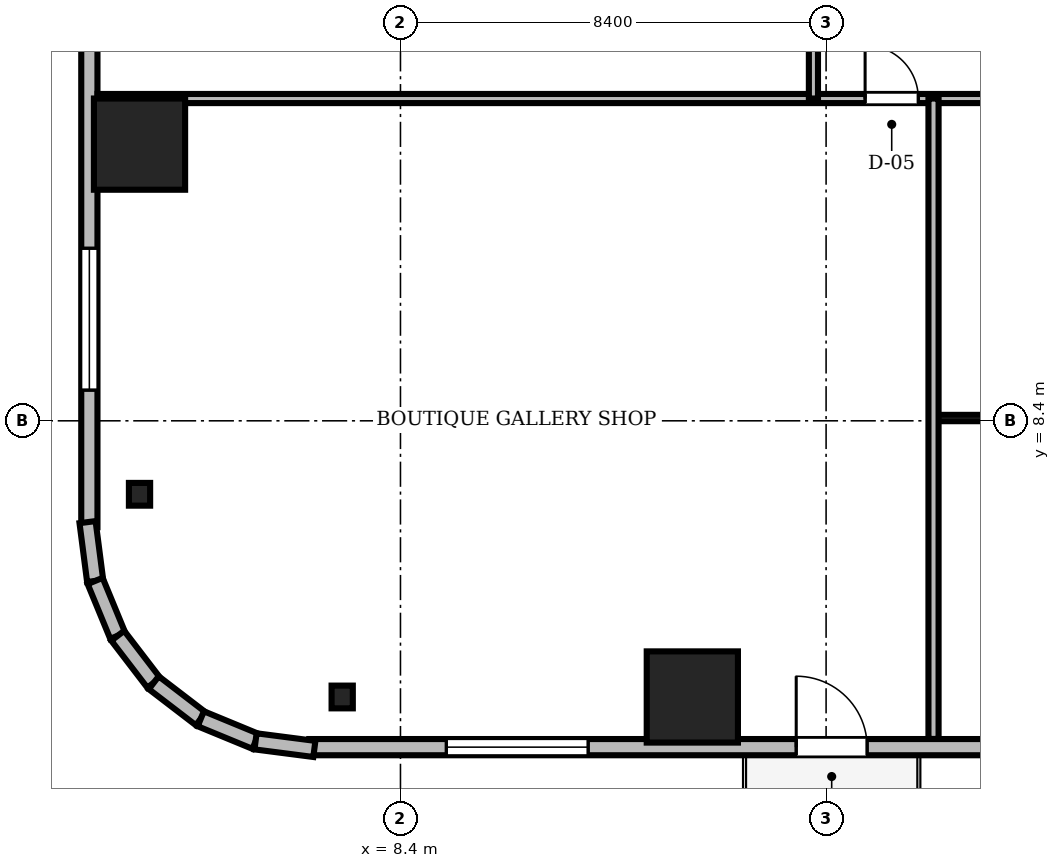
"""IFC4 building model, lengths in metres.
Left out: names, types, materials, properties, quantities, classifications, styles, units other than length and angle.
Written with IfcOpenShell. Run it as: python <this file> out.ifc"""

import sys

from ifc_helpers import new_model, si_unit, direction, frame, frame_2d, origin, origin_2d, place, context, subcontext, project, spatial, rectangle, i_section, extrude, source, transform, mapped, element, fill, save


model = new_model("IFC4")
c1 = context("Model", 3, precision=1e-05, world=origin(), true_north=direction((0.0, 1.0)))
c2 = subcontext(c1, "Body", "Model", "MODEL_VIEW")
j1 = project(units=[si_unit("LENGTHUNIT", "METRE"), si_unit("PLANEANGLEUNIT", "RADIAN")], contexts=[c1])
p1 = place(None, origin())
s1 = spatial("IfcSite", under=j1, at=p1, CompositionType="ELEMENT")
p2 = place(p1, origin())
s2 = spatial("IfcBuilding", under=s1, at=p2, CompositionType="ELEMENT")
p3 = place(p2, frame((0.0, 0.0, 78.7)))
s3 = spatial("IfcBuildingStorey", under=s2, at=p3, CompositionType="ELEMENT", Elevation=78.7)
m1 = source(origin(), c2, "Body", "SweptSolid", [
    extrude(rectangle(XDim=1.8, YDim=1.8, at=origin_2d()), origin(), (0.0, 0.0, 1.0), 3.41),
])
for number, where, z_axis, x_axis in (
    (1, (14.16, 2.95, 0.0), (0.0, 0.0, 1.0), (1.0, 0.0, 0.0)),
    (2, (3.25, 13.86, 0.0), (0.0, 0.0, 1.0), (1.0, 0.0, 0.0)),
):
    element("IfcColumn", number, at=place(p3, frame(where, z_axis=z_axis, x_axis=x_axis)), inside=s3, PredefinedType="COLUMN", context=c2, shape_type="MappedRepresentation", body=[
        mapped(m1, transform((0.0, 0.0, 0.0), scale=1.0)),
    ])
m2 = source(origin(), c2, "Body", "SweptSolid", [
    extrude(i_section(OverallWidth=0.419, OverallDepth=0.449, WebThickness=0.031, FlangeThickness=0.048, FilletRadius=0.015, at=origin_2d()), origin(), (0.0, 0.0, 1.0), 3.41),
])
for number, where, z_axis, x_axis in (
    (3, (7.25, 2.95, 0.0), (0.0, 0.0, 1.0), (1.0, 0.0, 0.0)),
    (4, (3.25, 6.95, 0.0), (0.0, 0.0, 1.0), (1.0, 0.0, 0.0)),
):
    element("IfcColumn", number, at=place(p3, frame(where, z_axis=z_axis, x_axis=x_axis)), inside=s3, PredefinedType="COLUMN", context=c2, shape_type="MappedRepresentation", body=[
        mapped(m2, transform((0.0, 0.0, 0.0), scale=1.0)),
    ])
m3 = source(origin(), c2, "Body", "SweptSolid", [
    extrude(rectangle(XDim=15.6, YDim=0.32, at=frame_2d((7.8, 0.0))), origin(), (0.0, 0.0, 1.0), 3.41),
])
p4 = place(p3, frame((6.6, 1.96, 0.0), z_axis=(0.0, 0.0, 1.0), x_axis=(1.0, 0.0, 0.0)))
e5 = element("IfcWall", 5, at=p4, inside=s3, PredefinedType="SOLIDWALL", context=c2, shape_type="MappedRepresentation", body=[
    mapped(m3, transform((0.0, 0.0, 0.0), scale=1.0)),
])
m4 = source(origin(), c2, "Body", "SweptSolid", [
    extrude(rectangle(XDim=1.4, YDim=2.3, at=frame_2d((0.7, 1.15))), frame((0.0, 0.17, 0.0), z_axis=(0.0, -1.0, 0.0), x_axis=(1.0, 0.0, 0.0)), (0.0, 0.0, 1.0), 0.34),
])
p5 = place(p4, frame((9.61, 0.0, 0.0)))
e6 = element("IfcOpeningElement", 6, at=p5, cuts=e5, PredefinedType="OPENING", context=c2, shape_type="MappedRepresentation", body=[
    mapped(m4, transform((0.0, 0.0, 0.0), scale=1.0)),
])
m5 = source(origin(), c2, "Body", "SweptSolid", [
    extrude(rectangle(XDim=2.8, YDim=2.4, at=frame_2d((1.4, 1.2))), frame((0.0, 0.17, 0.0), z_axis=(0.0, -1.0, 0.0), x_axis=(1.0, 0.0, 0.0)), (0.0, 0.0, 1.0), 0.34),
])
p6 = place(p4, frame((2.705, 0.0, 0.72)))
e7 = element("IfcOpeningElement", 7, at=p6, cuts=e5, PredefinedType="OPENING", context=c2, shape_type="MappedRepresentation", body=[
    mapped(m5, transform((0.0, 0.0, 0.0), scale=1.0)),
])
p7 = place(p3, frame((2.26, 21.9, 0.0), z_axis=(0.0, 0.0, 1.0), x_axis=(0.0, -1.0, 0.0)))
e8 = element("IfcWall", 8, at=p7, inside=s3, PredefinedType="SOLIDWALL", context=c2, shape_type="MappedRepresentation", body=[
    mapped(m3, transform((0.0, 0.0, 0.0), scale=1.0)),
])
p8 = place(p7, frame((10.095, 0.0, 0.72)))
e9 = element("IfcOpeningElement", 9, at=p8, cuts=e8, PredefinedType="OPENING", context=c2, shape_type="MappedRepresentation", body=[
    mapped(m5, transform((0.0, 0.0, 0.0), scale=1.0)),
])
m6 = source(origin(), c2, "Body", "SweptSolid", [
    extrude(rectangle(XDim=1.171, YDim=0.32, at=frame_2d((0.585, 0.0))), origin(), (0.0, 0.0, 1.0), 3.41),
])
p9 = place(p3, frame((2.224, 6.401, 0.0), z_axis=(0.0, 0.0, 1.0), x_axis=(0.128269133229, -0.991739395941, 0.0)))
e10 = element("IfcWall", 10, at=p9, inside=s3, PredefinedType="SOLIDWALL", context=c2, shape_type="MappedRepresentation", body=[
    mapped(m6, transform((0.0, 0.0, 0.0), scale=1.0)),
])
m7 = source(origin(), c2, "Body", "SweptSolid", [
    extrude(rectangle(XDim=1.169, YDim=0.32, at=frame_2d((0.584, 0.0))), origin(), (0.0, 0.0, 1.0), 3.41),
])
for number, where, z_axis, x_axis in (
    (11, (2.375, 5.24, 0.0), (0.0, 0.0, 1.0), (0.381, -0.925, 0.0)),
    (12, (2.82, 4.159, 0.0), (0.0, 0.0, 1.0), (0.608, -0.794, 0.0)),
):
    element("IfcWall", number, at=place(p3, frame(where, z_axis=z_axis, x_axis=x_axis)), inside=s3, PredefinedType="SOLIDWALL", context=c2, shape_type="MappedRepresentation", body=[
        mapped(m7, transform((0.0, 0.0, 0.0), scale=1.0)),
    ])
m8 = source(origin(), c2, "Body", "SweptSolid", [
    extrude(rectangle(XDim=1.169, YDim=0.32, at=frame_2d((0.584, 0.0))), origin(), (0.0, 0.0, 1.0), 3.41),
])
p10 = place(p3, frame((3.531, 3.231, 0.0), z_axis=(0.0, 0.0, 1.0), x_axis=(0.793663520347, -0.608356981114, 0.0)))
e13 = element("IfcWall", 13, at=p10, inside=s3, PredefinedType="SOLIDWALL", context=c2, shape_type="MappedRepresentation", body=[
    mapped(m8, transform((0.0, 0.0, 0.0), scale=1.0)),
])
m9 = source(origin(), c2, "Body", "SweptSolid", [
    extrude(rectangle(XDim=1.169, YDim=0.32, at=frame_2d((0.585, 0.0))), origin(), (0.0, 0.0, 1.0), 3.41),
])
p11 = place(p3, frame((4.459, 2.52, 0.0), z_axis=(0.0, 0.0, 1.0), x_axis=(0.924479075121, -0.381232789334, 0.0)))
e14 = element("IfcWall", 14, at=p11, inside=s3, PredefinedType="SOLIDWALL", context=c2, shape_type="MappedRepresentation", body=[
    mapped(m9, transform((0.0, 0.0, 0.0), scale=1.0)),
])
m10 = source(origin(), c2, "Body", "SweptSolid", [
    extrude(rectangle(XDim=1.17, YDim=0.32, at=frame_2d((0.585, 0.0))), origin(), (0.0, 0.0, 1.0), 3.41),
])
p12 = place(p3, frame((5.54, 2.074, 0.0), z_axis=(0.0, 0.0, 1.0), x_axis=(0.991762485493, -0.128090485085, 0.0)))
e15 = element("IfcWall", 15, at=p12, inside=s3, PredefinedType="SOLIDWALL", context=c2, shape_type="MappedRepresentation", body=[
    mapped(m10, transform((0.0, 0.0, 0.0), scale=1.0)),
])
m11 = source(origin(), c2, "Body", "SweptSolid", [
    extrude(rectangle(XDim=46.156, YDim=0.18, at=frame_2d((23.078, 0.0))), origin(), (0.0, 0.0, 1.0), 2.652),
])
p13 = place(p3, frame((2.422, 14.76, 0.0), z_axis=(0.0, 0.0, 1.0), x_axis=(1.0, 0.0, 0.0)))
e16 = element("IfcWall", 16, at=p13, inside=s3, PredefinedType="PARTITIONING", context=c2, shape_type="MappedRepresentation", body=[
    mapped(m11, transform((0.0, 0.0, 0.0), scale=1.0)),
])
m12 = source(origin(), c2, "Body", "SweptSolid", [
    extrude(rectangle(XDim=1.05, YDim=2.2, at=frame_2d((0.525, 1.1))), frame((0.0, 0.1, 0.0), z_axis=(0.0, -1.0, 0.0), x_axis=(1.0, 0.0, 0.0)), (0.0, 0.0, 1.0), 0.2),
])
p14 = place(p13, frame((15.148, 0.0, 0.0)))
e17 = element("IfcOpeningElement", 17, at=p14, cuts=e16, PredefinedType="OPENING", context=c2, shape_type="MappedRepresentation", body=[
    mapped(m12, transform((0.0, 0.0, 0.0), scale=1.0)),
])
p15 = place(p13, frame((19.38, 0.0, 0.0)))
e18 = element("IfcOpeningElement", 18, at=p15, cuts=e16, PredefinedType="OPENING", context=c2, shape_type="MappedRepresentation", body=[
    mapped(m12, transform((0.0, 0.0, 0.0), scale=1.0)),
])
p16 = place(p13, frame((26.183, 0.0, 0.0)))
e19 = element("IfcOpeningElement", 19, at=p16, cuts=e16, PredefinedType="OPENING", context=c2, shape_type="MappedRepresentation", body=[
    mapped(m12, transform((0.0, 0.0, 0.0), scale=1.0)),
])
p17 = place(p13, frame((32.986, 0.0, 0.0)))
e20 = element("IfcOpeningElement", 20, at=p17, cuts=e16, PredefinedType="OPENING", context=c2, shape_type="MappedRepresentation", body=[
    mapped(m12, transform((0.0, 0.0, 0.0), scale=1.0)),
])
p18 = place(p13, frame((40.998, 0.0, 0.0)))
e21 = element("IfcOpeningElement", 21, at=p18, cuts=e16, PredefinedType="OPENING", context=c2, shape_type="MappedRepresentation", body=[
    mapped(m12, transform((0.0, 0.0, 0.0), scale=1.0)),
])
m13 = source(origin(), c2, "Body", "SweptSolid", [
    extrude(rectangle(XDim=6.803, YDim=0.125, at=frame_2d((3.401, 0.0))), origin(), (0.0, 0.0, 1.0), 2.802),
])
p19 = place(p3, frame((18.92, 8.455, 0.0), z_axis=(0.0, 0.0, 1.0), x_axis=(1.0, 0.0, 0.0)))
e22 = element("IfcWall", 22, at=p19, inside=s3, PredefinedType="PARTITIONING", context=c2, shape_type="MappedRepresentation", body=[
    mapped(m13, transform((0.0, 0.0, 0.0), scale=1.0)),
])
m14 = source(origin(), c2, "Body", "SweptSolid", [
    extrude(rectangle(XDim=0.95, YDim=2.15, at=frame_2d((0.475, 1.075))), frame((0.0, 0.073, 0.0), z_axis=(0.0, -1.0, 0.0), x_axis=(1.0, 0.0, 0.0)), (0.0, 0.0, 1.0), 0.145),
])
p20 = place(p19, frame((2.922, 0.0, 0.0)))
e23 = element("IfcOpeningElement", 23, at=p20, cuts=e22, PredefinedType="OPENING", context=c2, shape_type="MappedRepresentation", body=[
    mapped(m14, transform((0.0, 0.0, 0.0), scale=1.0)),
])
m15 = source(origin(), c2, "Body", "SweptSolid", [
    extrude(rectangle(XDim=13.79, YDim=0.18, at=frame_2d((6.895, 0.0))), origin(), (0.0, 0.0, 1.0), 2.802),
])
p21 = place(p3, frame((16.55, 14.76, 0.0), z_axis=(0.0, 0.0, 1.0), x_axis=(0.0, 1.0, 0.0)))
e24 = element("IfcWall", 24, at=p21, inside=s3, PredefinedType="PARTITIONING", context=c2, shape_type="MappedRepresentation", body=[
    mapped(m15, transform((0.0, 0.0, 0.0), scale=1.0)),
])
m16 = source(origin(), c2, "Body", "SweptSolid", [
    extrude(rectangle(XDim=12.638, YDim=0.2, at=frame_2d((6.319, 0.0))), origin(), (0.0, 0.0, 1.0), 2.652),
])
p22 = place(p3, frame((18.92, 2.122, 0.0), z_axis=(0.0, 0.0, 1.0), x_axis=(0.0, 1.0, 0.0)))
e25 = element("IfcWall", 25, at=p22, inside=s3, PredefinedType="PARTITIONING", context=c2, shape_type="MappedRepresentation", body=[
    mapped(m16, transform((0.0, 0.0, 0.0), scale=1.0)),
])
m17 = source(origin(), c2, "Body", "SweptSolid", [
    extrude(rectangle(XDim=1.4, YDim=2.3, at=frame_2d((0.7, 1.15))), frame((0.0, 0.025, 0.0), z_axis=(0.0, -1.0, 0.0), x_axis=(1.0, 0.0, 0.0)), (0.0, 0.0, 1.0), 0.05),
])
p23 = place(p5, frame((1.4, 0.0, 0.0), z_axis=(0.0, 0.0, 1.0), x_axis=(-1.0, 0.0, 0.0)))
e26 = element("IfcDoor", 26, at=p23, inside=s3, OperationType="DOUBLE_DOOR_SLIDING", PredefinedType="DOOR", context=c2, shape_type="MappedRepresentation", body=[
    mapped(m17, transform((0.0, 0.0, 0.0), scale=1.0)),
])
fill(e6, e26)
m18 = source(origin(), c2, "Body", "SweptSolid", [
    extrude(rectangle(XDim=2.8, YDim=2.4, at=frame_2d((1.4, 1.2))), frame((0.0, 0.03, 0.0), z_axis=(0.0, -1.0, 0.0), x_axis=(1.0, 0.0, 0.0)), (0.0, 0.0, 1.0), 0.06),
])
p24 = place(p6, origin())
e27 = element("IfcWindow", 27, at=p24, inside=s3, PartitioningType="SINGLE_PANEL", PredefinedType="WINDOW", context=c2, shape_type="MappedRepresentation", body=[
    mapped(m18, transform((0.0, 0.0, 0.0), scale=1.0)),
])
fill(e7, e27)
p25 = place(p8, origin())
e28 = element("IfcWindow", 28, at=p25, inside=s3, PartitioningType="SINGLE_PANEL", PredefinedType="WINDOW", context=c2, shape_type="MappedRepresentation", body=[
    mapped(m18, transform((0.0, 0.0, 0.0), scale=1.0)),
])
fill(e9, e28)
m19 = source(origin(), c2, "Body", "SweptSolid", [
    extrude(rectangle(XDim=1.05, YDim=2.2, at=frame_2d((0.525, 1.1))), frame((0.0, 0.025, 0.0), z_axis=(0.0, -1.0, 0.0), x_axis=(1.0, 0.0, 0.0)), (0.0, 0.0, 1.0), 0.05),
])
p26 = place(p14, origin())
e29 = element("IfcDoor", 29, at=p26, inside=s3, OperationType="SINGLE_SWING_LEFT", PredefinedType="DOOR", context=c2, shape_type="MappedRepresentation", body=[
    mapped(m19, transform((0.0, 0.0, 0.0), scale=1.0)),
])
fill(e17, e29)
save(model, sys.argv[1])
